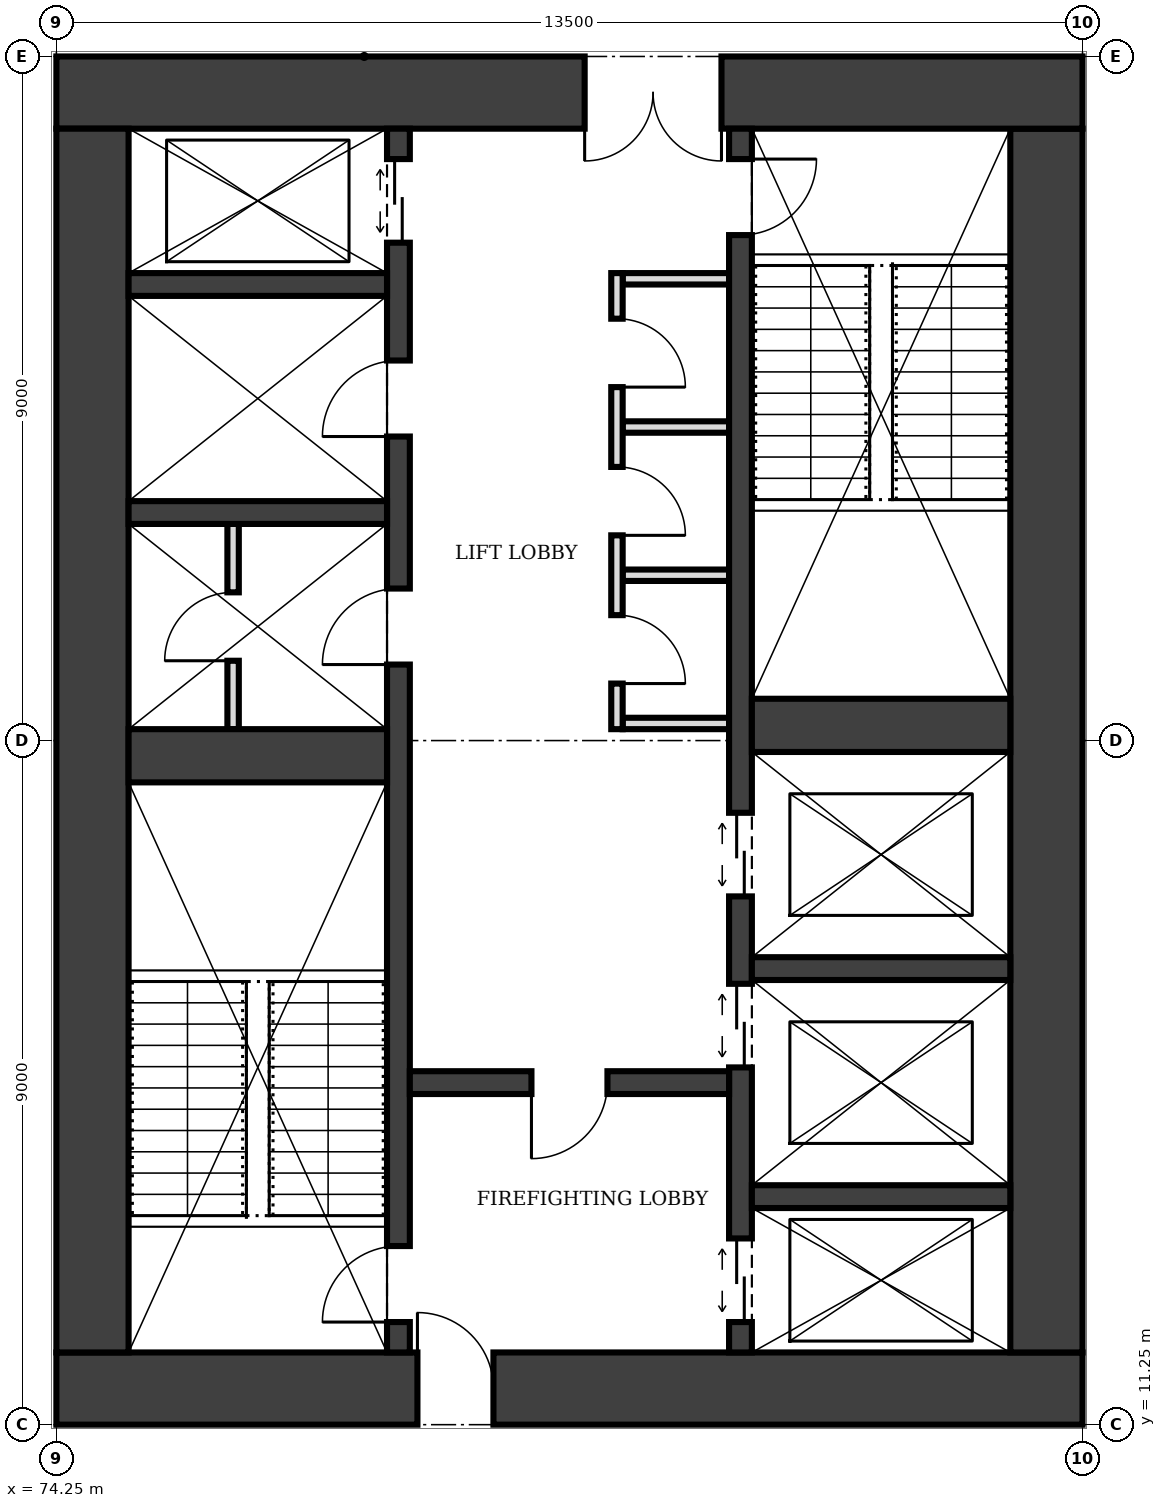
"""IFC4 building model, lengths in metres.
Left out: names, types, materials, properties, quantities, classifications, styles, units other than length and angle.
Written with IfcOpenShell. Run it as: python <this file> out.ifc"""

import sys

from ifc_helpers import new_model, si_unit, direction, frame, frame_2d, origin, place, context, subcontext, project, spatial, rectangle, extrude, element, fill, save


model = new_model("IFC4")
c1 = context("Model", 3, precision=1e-05, world=origin(), true_north=direction((0.0, 1.0)))
c2 = subcontext(c1, "Body", "Model", "MODEL_VIEW")
j1 = project(units=[si_unit("LENGTHUNIT", "METRE"), si_unit("PLANEANGLEUNIT", "RADIAN")], contexts=[c1])
p1 = place(None, origin())
s1 = spatial("IfcSite", under=j1, at=p1, CompositionType="ELEMENT")
p2 = place(p1, origin())
s2 = spatial("IfcBuilding", under=s1, at=p2, CompositionType="ELEMENT")
p3 = place(p2, frame((0.0, 0.0, 201.0)))
s3 = spatial("IfcBuildingStorey", under=s2, at=p3, CompositionType="ELEMENT", Elevation=201.0)
p4 = place(p3, frame((74.25, 11.725, 0.0), z_axis=(0.0, 0.0, 1.0), x_axis=(1.0, 0.0, 0.0)))
e1 = element("IfcWall", 1, at=p4, inside=s3, PredefinedType="SHEAR", context=c2, shape_type="SweptSolid", body=[
    extrude(rectangle(XDim=13.5, YDim=0.95, at=frame_2d((6.75, 0.0))), origin(), (0.0, 0.0, 1.0), 4.0),
])
p5 = place(p4, frame((4.75, 0.0, 0.0)))
e2 = element("IfcOpeningElement", 2, at=p5, cuts=e1, PredefinedType="OPENING", context=c2, shape_type="SweptSolid", body=[
    extrude(rectangle(XDim=1.0, YDim=2.1, at=frame_2d((0.5, 1.05))), frame((0.0, 0.485, 0.0), z_axis=(0.0, -1.0, 0.0), x_axis=(1.0, 0.0, 0.0)), (0.0, 0.0, 1.0), 0.97),
])
p6 = place(p3, frame((87.275, 12.2, 0.0), z_axis=(0.0, 0.0, 1.0), x_axis=(0.0, 1.0, 0.0)))
e3 = element("IfcWall", 3, at=p6, inside=s3, PredefinedType="SHEAR", context=c2, shape_type="SweptSolid", body=[
    extrude(rectangle(XDim=16.1, YDim=0.95, at=frame_2d((8.05, 0.0))), origin(), (0.0, 0.0, 1.0), 4.0),
])
p7 = place(p3, frame((87.75, 28.775, 0.0), z_axis=(0.0, 0.0, 1.0), x_axis=(-1.0, 0.0, 0.0)))
e4 = element("IfcWall", 4, at=p7, inside=s3, PredefinedType="SHEAR", context=c2, shape_type="SweptSolid", body=[
    extrude(rectangle(XDim=13.5, YDim=0.95, at=frame_2d((6.75, 0.0))), origin(), (0.0, 0.0, 1.0), 4.0),
])
p8 = place(p7, frame((4.75, 0.0, 0.0)))
e5 = element("IfcOpeningElement", 5, at=p8, cuts=e4, PredefinedType="OPENING", context=c2, shape_type="SweptSolid", body=[
    extrude(rectangle(XDim=1.8, YDim=2.1, at=frame_2d((0.9, 1.05))), frame((0.0, 0.485, 0.0), z_axis=(0.0, -1.0, 0.0), x_axis=(1.0, 0.0, 0.0)), (0.0, 0.0, 1.0), 0.97),
])
p9 = place(p3, frame((74.725, 28.3, 0.0), z_axis=(0.0, 0.0, 1.0), x_axis=(0.0, -1.0, 0.0)))
e6 = element("IfcWall", 6, at=p9, inside=s3, PredefinedType="SHEAR", context=c2, shape_type="SweptSolid", body=[
    extrude(rectangle(XDim=16.1, YDim=0.95, at=frame_2d((8.05, 0.0))), origin(), (0.0, 0.0, 1.0), 4.0),
])
p10 = place(p3, frame((78.75, 12.2, 0.0), z_axis=(0.0, 0.0, 1.0), x_axis=(0.0, 1.0, 0.0)))
e7 = element("IfcWall", 7, at=p10, inside=s3, PredefinedType="SHEAR", context=c2, shape_type="SweptSolid", body=[
    extrude(rectangle(XDim=16.1, YDim=0.3, at=frame_2d((8.05, 0.0))), origin(), (0.0, 0.0, 1.0), 4.0),
])
p11 = place(p10, frame((0.4, 0.0, 0.0)))
e8 = element("IfcOpeningElement", 8, at=p11, cuts=e7, PredefinedType="OPENING", context=c2, shape_type="SweptSolid", body=[
    extrude(rectangle(XDim=1.0, YDim=2.1, at=frame_2d((0.5, 1.05))), frame((0.0, 0.16, 0.0), z_axis=(0.0, -1.0, 0.0), x_axis=(1.0, 0.0, 0.0)), (0.0, 0.0, 1.0), 0.32),
])
p12 = place(p10, frame((14.6, 0.0, 0.0)))
e9 = element("IfcOpeningElement", 9, at=p12, cuts=e7, PredefinedType="OPENING", context=c2, shape_type="SweptSolid", body=[
    extrude(rectangle(XDim=1.1, YDim=2.1, at=frame_2d((0.55, 1.05))), frame((0.0, 0.16, 0.0), z_axis=(0.0, -1.0, 0.0), x_axis=(1.0, 0.0, 0.0)), (0.0, 0.0, 1.0), 0.32),
])
p13 = place(p10, frame((9.05, 0.0, 0.0)))
e10 = element("IfcOpeningElement", 10, at=p13, cuts=e7, PredefinedType="OPENING", context=c2, shape_type="SweptSolid", body=[
    extrude(rectangle(XDim=1.0, YDim=2.1, at=frame_2d((0.5, 1.05))), frame((0.0, 0.16, 0.0), z_axis=(0.0, -1.0, 0.0), x_axis=(1.0, 0.0, 0.0)), (0.0, 0.0, 1.0), 0.32),
])
p14 = place(p10, frame((12.05, 0.0, 0.0)))
e11 = element("IfcOpeningElement", 11, at=p14, cuts=e7, PredefinedType="OPENING", context=c2, shape_type="SweptSolid", body=[
    extrude(rectangle(XDim=1.0, YDim=2.1, at=frame_2d((0.5, 1.05))), frame((0.0, 0.16, 0.0), z_axis=(0.0, -1.0, 0.0), x_axis=(1.0, 0.0, 0.0)), (0.0, 0.0, 1.0), 0.32),
])
p15 = place(p3, frame((83.25, 12.2, 0.0), z_axis=(0.0, 0.0, 1.0), x_axis=(0.0, 1.0, 0.0)))
e12 = element("IfcWall", 12, at=p15, inside=s3, PredefinedType="SHEAR", context=c2, shape_type="SweptSolid", body=[
    extrude(rectangle(XDim=16.1, YDim=0.3, at=frame_2d((8.05, 0.0))), origin(), (0.0, 0.0, 1.0), 4.0),
])
p16 = place(p15, frame((14.7, 0.0, 0.0)))
e13 = element("IfcOpeningElement", 13, at=p16, cuts=e12, PredefinedType="OPENING", context=c2, shape_type="SweptSolid", body=[
    extrude(rectangle(XDim=1.0, YDim=2.1, at=frame_2d((0.5, 1.05))), frame((0.0, 0.16, 0.0), z_axis=(0.0, -1.0, 0.0), x_axis=(1.0, 0.0, 0.0)), (0.0, 0.0, 1.0), 0.32),
])
p17 = place(p15, frame((0.4, 0.0, 0.0)))
e14 = element("IfcOpeningElement", 14, at=p17, cuts=e12, PredefinedType="OPENING", context=c2, shape_type="SweptSolid", body=[
    extrude(rectangle(XDim=1.1, YDim=2.1, at=frame_2d((0.55, 1.05))), frame((0.0, 0.16, 0.0), z_axis=(0.0, -1.0, 0.0), x_axis=(1.0, 0.0, 0.0)), (0.0, 0.0, 1.0), 0.32),
])
p18 = place(p15, frame((3.75, 0.0, 0.0)))
e15 = element("IfcOpeningElement", 15, at=p18, cuts=e12, PredefinedType="OPENING", context=c2, shape_type="SweptSolid", body=[
    extrude(rectangle(XDim=1.1, YDim=2.1, at=frame_2d((0.55, 1.05))), frame((0.0, 0.16, 0.0), z_axis=(0.0, -1.0, 0.0), x_axis=(1.0, 0.0, 0.0)), (0.0, 0.0, 1.0), 0.32),
])
p19 = place(p15, frame((6.0, 0.0, 0.0)))
e16 = element("IfcOpeningElement", 16, at=p19, cuts=e12, PredefinedType="OPENING", context=c2, shape_type="SweptSolid", body=[
    extrude(rectangle(XDim=1.1, YDim=2.1, at=frame_2d((0.55, 1.05))), frame((0.0, 0.16, 0.0), z_axis=(0.0, -1.0, 0.0), x_axis=(1.0, 0.0, 0.0)), (0.0, 0.0, 1.0), 0.32),
])
p20 = place(p3, frame((75.2, 20.05, 0.0), z_axis=(0.0, 0.0, 1.0), x_axis=(1.0, 0.0, 0.0)))
e17 = element("IfcWall", 17, at=p20, inside=s3, PredefinedType="SHEAR", context=c2, shape_type="SweptSolid", body=[
    extrude(rectangle(XDim=3.4, YDim=0.7, at=frame_2d((1.7, 0.0))), origin(), (0.0, 0.0, 1.0), 4.0),
])
p21 = place(p3, frame((78.9, 15.75, 0.0), z_axis=(0.0, 0.0, 1.0), x_axis=(1.0, 0.0, 0.0)))
e18 = element("IfcWall", 18, at=p21, inside=s3, PredefinedType="SHEAR", context=c2, shape_type="SweptSolid", body=[
    extrude(rectangle(XDim=4.2, YDim=0.3, at=frame_2d((2.1, 0.0))), origin(), (0.0, 0.0, 1.0), 4.0),
])
p22 = place(p21, frame((1.6, 0.0, 0.0)))
e19 = element("IfcOpeningElement", 19, at=p22, cuts=e18, PredefinedType="OPENING", context=c2, shape_type="SweptSolid", body=[
    extrude(rectangle(XDim=1.0, YDim=2.1, at=frame_2d((0.5, 1.05))), frame((0.0, 0.16, 0.0), z_axis=(0.0, -1.0, 0.0), x_axis=(1.0, 0.0, 0.0)), (0.0, 0.0, 1.0), 0.32),
])
for number, where, z_axis, x_axis in (
    (20, (83.4, 14.25, 0.0), (0.0, 0.0, 1.0), (1.0, 0.0, 0.0)),
    (21, (83.4, 17.25, 0.0), (0.0, 0.0, 1.0), (1.0, 0.0, 0.0)),
):
    element("IfcWall", number, at=place(p3, frame(where, z_axis=z_axis, x_axis=x_axis)), inside=s3, PredefinedType="SHEAR", context=c2, shape_type="SweptSolid", body=[
        extrude(rectangle(XDim=3.4, YDim=0.3, at=frame_2d((1.7, 0.0))), origin(), (0.0, 0.0, 1.0), 4.0),
    ])
p23 = place(p3, frame((83.4, 20.45, 0.0), z_axis=(0.0, 0.0, 1.0), x_axis=(1.0, 0.0, 0.0)))
e22 = element("IfcWall", 22, at=p23, inside=s3, PredefinedType="SHEAR", context=c2, shape_type="SweptSolid", body=[
    extrude(rectangle(XDim=3.4, YDim=0.7, at=frame_2d((1.7, 0.0))), origin(), (0.0, 0.0, 1.0), 4.0),
])
for number, where, z_axis, x_axis in (
    (23, (75.2, 23.25, 0.0), (0.0, 0.0, 1.0), (1.0, 0.0, 0.0)),
    (24, (75.2, 26.25, 0.0), (0.0, 0.0, 1.0), (1.0, 0.0, 0.0)),
):
    element("IfcWall", number, at=place(p3, frame(where, z_axis=z_axis, x_axis=x_axis)), inside=s3, PredefinedType="SHEAR", context=c2, shape_type="SweptSolid", body=[
        extrude(rectangle(XDim=3.4, YDim=0.3, at=frame_2d((1.7, 0.0))), origin(), (0.0, 0.0, 1.0), 4.0),
    ])
p24 = place(p3, frame((81.625, 20.4, 0.0), z_axis=(0.0, 0.0, 1.0), x_axis=(0.0, 1.0, 0.0)))
e25 = element("IfcWall", 25, at=p24, inside=s3, PredefinedType="PARTITIONING", context=c2, shape_type="SweptSolid", body=[
    extrude(rectangle(XDim=6.0, YDim=0.15, at=frame_2d((3.0, 0.0))), origin(), (0.0, 0.0, 1.0), 3.75),
])
p25 = place(p24, frame((0.6, 0.0, 0.0)))
e26 = element("IfcOpeningElement", 26, at=p25, cuts=e25, PredefinedType="OPENING", context=c2, shape_type="SweptSolid", body=[
    extrude(rectangle(XDim=0.9, YDim=2.1, at=frame_2d((0.45, 1.05))), frame((0.0, 0.085, 0.0), z_axis=(0.0, -1.0, 0.0), x_axis=(1.0, 0.0, 0.0)), (0.0, 0.0, 1.0), 0.17),
])
p26 = place(p24, frame((2.55, 0.0, 0.0)))
e27 = element("IfcOpeningElement", 27, at=p26, cuts=e25, PredefinedType="OPENING", context=c2, shape_type="SweptSolid", body=[
    extrude(rectangle(XDim=0.9, YDim=2.1, at=frame_2d((0.45, 1.05))), frame((0.0, 0.085, 0.0), z_axis=(0.0, -1.0, 0.0), x_axis=(1.0, 0.0, 0.0)), (0.0, 0.0, 1.0), 0.17),
])
p27 = place(p24, frame((4.5, 0.0, 0.0)))
e28 = element("IfcOpeningElement", 28, at=p27, cuts=e25, PredefinedType="OPENING", context=c2, shape_type="SweptSolid", body=[
    extrude(rectangle(XDim=0.9, YDim=2.1, at=frame_2d((0.45, 1.05))), frame((0.0, 0.085, 0.0), z_axis=(0.0, -1.0, 0.0), x_axis=(1.0, 0.0, 0.0)), (0.0, 0.0, 1.0), 0.17),
])
for number, where, z_axis, x_axis in (
    (29, (81.7, 20.475, 0.0), (0.0, 0.0, 1.0), (1.0, 0.0, 0.0)),
    (30, (81.7, 22.425, 0.0), (0.0, 0.0, 1.0), (1.0, 0.0, 0.0)),
    (31, (81.7, 24.375, 0.0), (0.0, 0.0, 1.0), (1.0, 0.0, 0.0)),
    (32, (81.7, 26.325, 0.0), (0.0, 0.0, 1.0), (1.0, 0.0, 0.0)),
):
    element("IfcWall", number, at=place(p3, frame(where, z_axis=z_axis, x_axis=x_axis)), inside=s3, PredefinedType="PARTITIONING", context=c2, shape_type="SweptSolid", body=[
        extrude(rectangle(XDim=1.4, YDim=0.15, at=frame_2d((0.7, 0.0))), origin(), (0.0, 0.0, 1.0), 3.75),
    ])
p28 = place(p3, frame((76.575, 20.4, 0.0), z_axis=(0.0, 0.0, 1.0), x_axis=(0.0, 1.0, 0.0)))
e33 = element("IfcWall", 33, at=p28, inside=s3, PredefinedType="PARTITIONING", context=c2, shape_type="SweptSolid", body=[
    extrude(rectangle(XDim=2.7, YDim=0.15, at=frame_2d((1.35, 0.0))), origin(), (0.0, 0.0, 1.0), 3.75),
])
p29 = place(p28, frame((0.9, 0.0, 0.0)))
e34 = element("IfcOpeningElement", 34, at=p29, cuts=e33, PredefinedType="OPENING", context=c2, shape_type="SweptSolid", body=[
    extrude(rectangle(XDim=0.9, YDim=2.1, at=frame_2d((0.45, 1.05))), frame((0.0, 0.085, 0.0), z_axis=(0.0, -1.0, 0.0), x_axis=(1.0, 0.0, 0.0)), (0.0, 0.0, 1.0), 0.17),
])
p30 = place(p5, origin())
e35 = element("IfcDoor", 35, at=p30, inside=s3, OperationType="SINGLE_SWING_LEFT", PredefinedType="DOOR", context=c2, shape_type="SweptSolid", body=[
    extrude(rectangle(XDim=1.0, YDim=2.1, at=frame_2d((0.5, 1.05))), frame((0.0, 0.025, 0.0), z_axis=(0.0, -1.0, 0.0), x_axis=(1.0, 0.0, 0.0)), (0.0, 0.0, 1.0), 0.05),
])
fill(e2, e35)
p31 = place(p8, origin())
e36 = element("IfcDoor", 36, at=p31, inside=s3, OperationType="DOUBLE_DOOR_SINGLE_SWING", PredefinedType="DOOR", context=c2, shape_type="SweptSolid", body=[
    extrude(rectangle(XDim=1.8, YDim=2.1, at=frame_2d((0.9, 1.05))), frame((0.0, 0.025, 0.0), z_axis=(0.0, -1.0, 0.0), x_axis=(1.0, 0.0, 0.0)), (0.0, 0.0, 1.0), 0.05),
])
fill(e5, e36)
p32 = place(p22, frame((1.0, 0.0, 0.0), z_axis=(0.0, 0.0, 1.0), x_axis=(-1.0, 0.0, 0.0)))
e37 = element("IfcDoor", 37, at=p32, inside=s3, OperationType="SINGLE_SWING_RIGHT", PredefinedType="DOOR", context=c2, shape_type="SweptSolid", body=[
    extrude(rectangle(XDim=1.0, YDim=2.1, at=frame_2d((0.5, 1.05))), frame((0.0, 0.025, 0.0), z_axis=(0.0, -1.0, 0.0), x_axis=(1.0, 0.0, 0.0)), (0.0, 0.0, 1.0), 0.05),
])
fill(e19, e37)
p33 = place(p11, origin())
e38 = element("IfcDoor", 38, at=p33, inside=s3, OperationType="SINGLE_SWING_LEFT", PredefinedType="DOOR", context=c2, shape_type="SweptSolid", body=[
    extrude(rectangle(XDim=1.0, YDim=2.1, at=frame_2d((0.5, 1.05))), frame((0.0, 0.025, 0.0), z_axis=(0.0, -1.0, 0.0), x_axis=(1.0, 0.0, 0.0)), (0.0, 0.0, 1.0), 0.05),
])
fill(e8, e38)
p34 = place(p16, frame((1.0, 0.0, 0.0), z_axis=(0.0, 0.0, 1.0), x_axis=(-1.0, 0.0, 0.0)))
e39 = element("IfcDoor", 39, at=p34, inside=s3, OperationType="SINGLE_SWING_LEFT", PredefinedType="DOOR", context=c2, shape_type="SweptSolid", body=[
    extrude(rectangle(XDim=1.0, YDim=2.1, at=frame_2d((0.5, 1.05))), frame((0.0, 0.025, 0.0), z_axis=(0.0, -1.0, 0.0), x_axis=(1.0, 0.0, 0.0)), (0.0, 0.0, 1.0), 0.05),
])
fill(e13, e39)
p35 = place(p17, origin())
e40 = element("IfcDoor", 40, at=p35, inside=s3, OperationType="DOUBLE_DOOR_SLIDING", PredefinedType="DOOR", context=c2, shape_type="SweptSolid", body=[
    extrude(rectangle(XDim=1.1, YDim=2.1, at=frame_2d((0.55, 1.05))), frame((0.0, 0.025, 0.0), z_axis=(0.0, -1.0, 0.0), x_axis=(1.0, 0.0, 0.0)), (0.0, 0.0, 1.0), 0.05),
])
fill(e14, e40)
p36 = place(p12, origin())
e41 = element("IfcDoor", 41, at=p36, inside=s3, OperationType="DOUBLE_DOOR_SLIDING", PredefinedType="DOOR", context=c2, shape_type="SweptSolid", body=[
    extrude(rectangle(XDim=1.1, YDim=2.1, at=frame_2d((0.55, 1.05))), frame((0.0, 0.025, 0.0), z_axis=(0.0, -1.0, 0.0), x_axis=(1.0, 0.0, 0.0)), (0.0, 0.0, 1.0), 0.05),
])
fill(e9, e41)
p37 = place(p18, origin())
e42 = element("IfcDoor", 42, at=p37, inside=s3, OperationType="DOUBLE_DOOR_SLIDING", PredefinedType="DOOR", context=c2, shape_type="SweptSolid", body=[
    extrude(rectangle(XDim=1.1, YDim=2.1, at=frame_2d((0.55, 1.05))), frame((0.0, 0.025, 0.0), z_axis=(0.0, -1.0, 0.0), x_axis=(1.0, 0.0, 0.0)), (0.0, 0.0, 1.0), 0.05),
])
fill(e15, e42)
p38 = place(p19, origin())
e43 = element("IfcDoor", 43, at=p38, inside=s3, OperationType="DOUBLE_DOOR_SLIDING", PredefinedType="DOOR", context=c2, shape_type="SweptSolid", body=[
    extrude(rectangle(XDim=1.1, YDim=2.1, at=frame_2d((0.55, 1.05))), frame((0.0, 0.025, 0.0), z_axis=(0.0, -1.0, 0.0), x_axis=(1.0, 0.0, 0.0)), (0.0, 0.0, 1.0), 0.05),
])
fill(e16, e43)
p39 = place(p25, frame((0.9, 0.0, 0.0), z_axis=(0.0, 0.0, 1.0), x_axis=(-1.0, 0.0, 0.0)))
e44 = element("IfcDoor", 44, at=p39, inside=s3, OperationType="SINGLE_SWING_RIGHT", PredefinedType="DOOR", context=c2, shape_type="SweptSolid", body=[
    extrude(rectangle(XDim=0.9, YDim=2.1, at=frame_2d((0.45, 1.05))), frame((0.0, 0.025, 0.0), z_axis=(0.0, -1.0, 0.0), x_axis=(1.0, 0.0, 0.0)), (0.0, 0.0, 1.0), 0.05),
])
fill(e26, e44)
p40 = place(p26, frame((0.9, 0.0, 0.0), z_axis=(0.0, 0.0, 1.0), x_axis=(-1.0, 0.0, 0.0)))
e45 = element("IfcDoor", 45, at=p40, inside=s3, OperationType="SINGLE_SWING_RIGHT", PredefinedType="DOOR", context=c2, shape_type="SweptSolid", body=[
    extrude(rectangle(XDim=0.9, YDim=2.1, at=frame_2d((0.45, 1.05))), frame((0.0, 0.025, 0.0), z_axis=(0.0, -1.0, 0.0), x_axis=(1.0, 0.0, 0.0)), (0.0, 0.0, 1.0), 0.05),
])
fill(e27, e45)
p41 = place(p27, frame((0.9, 0.0, 0.0), z_axis=(0.0, 0.0, 1.0), x_axis=(-1.0, 0.0, 0.0)))
e46 = element("IfcDoor", 46, at=p41, inside=s3, OperationType="SINGLE_SWING_RIGHT", PredefinedType="DOOR", context=c2, shape_type="SweptSolid", body=[
    extrude(rectangle(XDim=0.9, YDim=2.1, at=frame_2d((0.45, 1.05))), frame((0.0, 0.025, 0.0), z_axis=(0.0, -1.0, 0.0), x_axis=(1.0, 0.0, 0.0)), (0.0, 0.0, 1.0), 0.05),
])
fill(e28, e46)
p42 = place(p13, origin())
e47 = element("IfcDoor", 47, at=p42, inside=s3, OperationType="SINGLE_SWING_LEFT", PredefinedType="DOOR", context=c2, shape_type="SweptSolid", body=[
    extrude(rectangle(XDim=1.0, YDim=2.1, at=frame_2d((0.5, 1.05))), frame((0.0, 0.025, 0.0), z_axis=(0.0, -1.0, 0.0), x_axis=(1.0, 0.0, 0.0)), (0.0, 0.0, 1.0), 0.05),
])
fill(e10, e47)
p43 = place(p29, origin())
e48 = element("IfcDoor", 48, at=p43, inside=s3, OperationType="SINGLE_SWING_LEFT", PredefinedType="DOOR", context=c2, shape_type="SweptSolid", body=[
    extrude(rectangle(XDim=0.9, YDim=2.1, at=frame_2d((0.45, 1.05))), frame((0.0, 0.025, 0.0), z_axis=(0.0, -1.0, 0.0), x_axis=(1.0, 0.0, 0.0)), (0.0, 0.0, 1.0), 0.05),
])
fill(e34, e48)
p44 = place(p14, origin())
e49 = element("IfcDoor", 49, at=p44, inside=s3, OperationType="SINGLE_SWING_LEFT", PredefinedType="DOOR", context=c2, shape_type="SweptSolid", body=[
    extrude(rectangle(XDim=1.0, YDim=2.1, at=frame_2d((0.5, 1.05))), frame((0.0, 0.025, 0.0), z_axis=(0.0, -1.0, 0.0), x_axis=(1.0, 0.0, 0.0)), (0.0, 0.0, 1.0), 0.05),
])
fill(e11, e49)
save(model, sys.argv[1])
